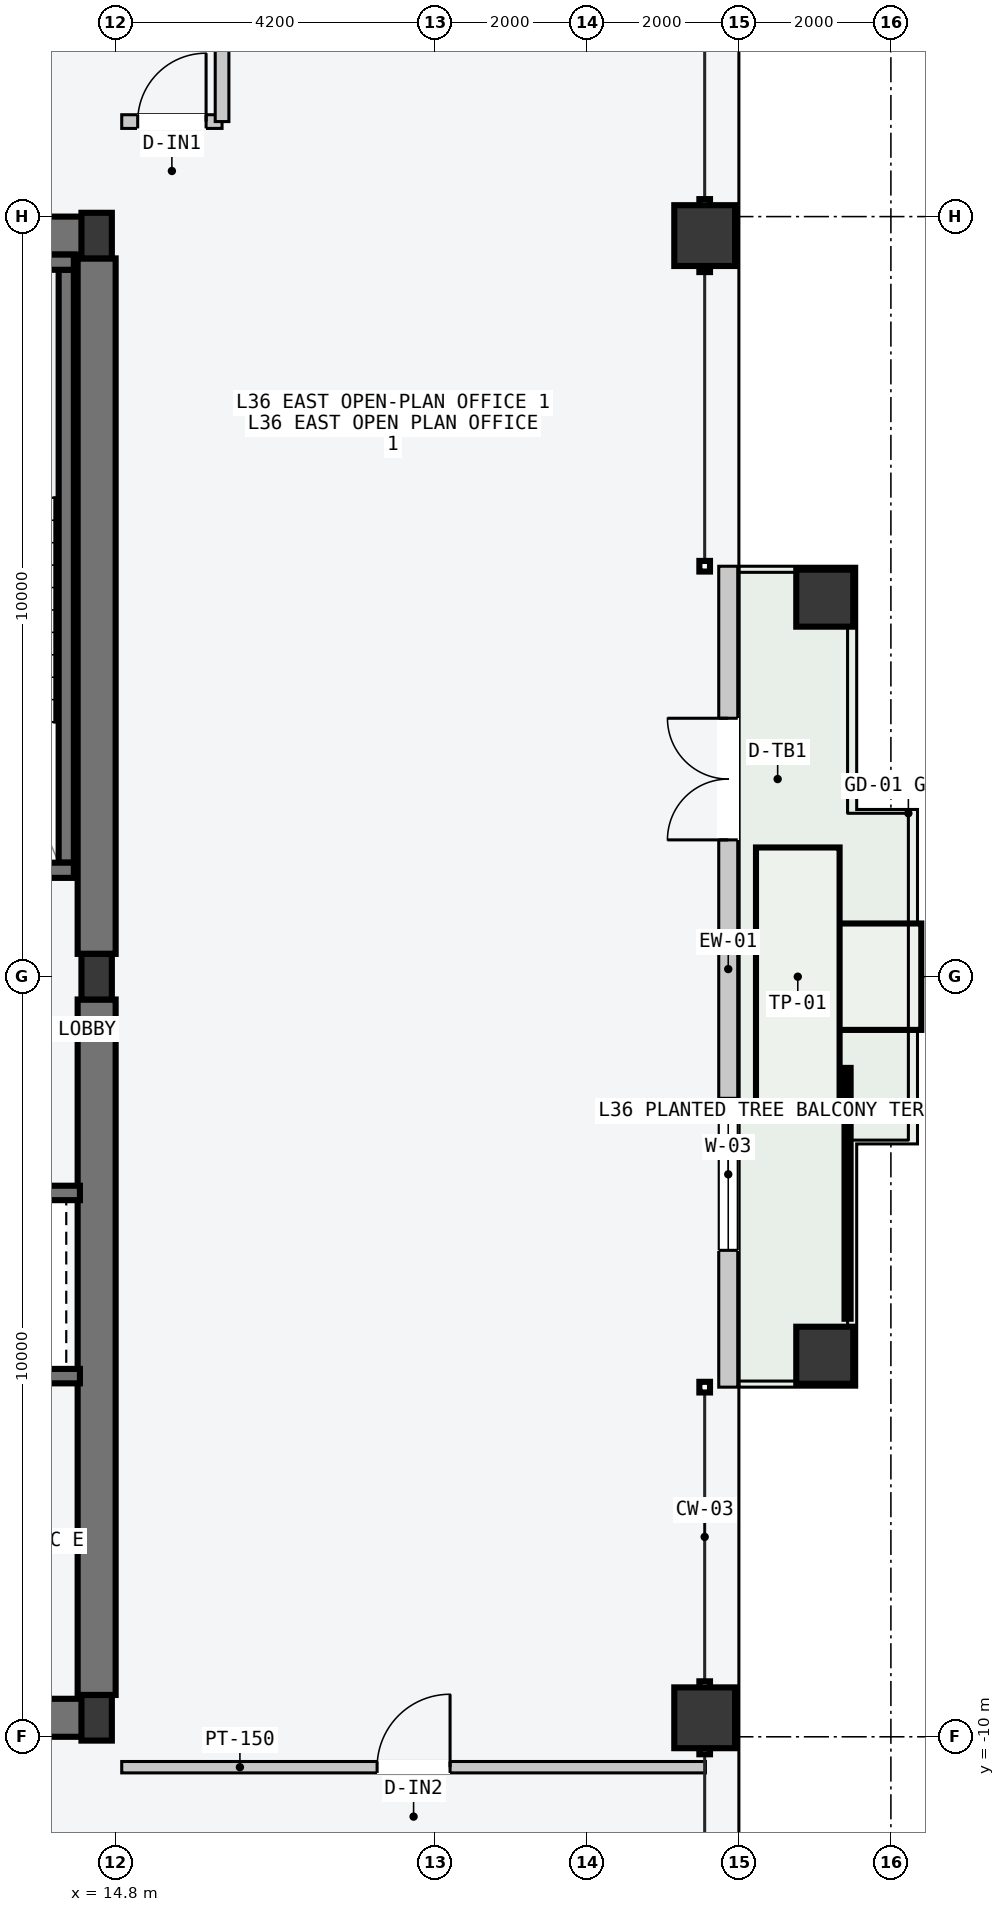
"""IFC4 building model, lengths in metres.
Left out: names, types, materials, properties, quantities, classifications, styles, units other than length and angle.
Written with IfcOpenShell. Run it as: python <this file> out.ifc"""

import sys

from ifc_helpers import new_model, si_unit, direction, frame, frame_2d, origin, origin_2d, place, context, subcontext, project, spatial, rectangle, hollow_rectangle, i_section, extrude, element, fill, save


model = new_model("IFC4")
c1 = context("Model", 3, precision=1e-05, world=origin(), true_north=direction((0.0, 1.0)))
c2 = subcontext(c1, "Body", "Model", "MODEL_VIEW")
j1 = project(units=[si_unit("LENGTHUNIT", "METRE"), si_unit("PLANEANGLEUNIT", "RADIAN")], contexts=[c1])
p1 = place(None, origin())
s1 = spatial("IfcSite", under=j1, at=p1, CompositionType="ELEMENT")
p2 = place(p1, origin())
s2 = spatial("IfcBuilding", under=s1, at=p2, CompositionType="ELEMENT")
p3 = place(p2, frame((0.0, 0.0, 138.6)))
s3 = spatial("IfcBuildingStorey", under=s2, at=p3, CompositionType="ELEMENT", Elevation=138.6)
for number, where, z_axis, x_axis in (
    (1, (8.07, -9.75, -0.2), (0.0, 0.0, 1.0), (1.0, 0.0, 0.0)),
    (2, (8.07, 9.75, -0.2), (0.0, 0.0, 1.0), (1.0, 0.0, 0.0)),
):
    element("IfcWall", number, at=place(p3, frame(where, z_axis=z_axis, x_axis=x_axis)), inside=s3, PredefinedType="SHEAR", context=c2, shape_type="SweptSolid", body=[
        extrude(rectangle(XDim=6.46, YDim=0.5, at=frame_2d((3.23, 0.0))), origin(), (0.0, 0.0, 1.0), 3.6),
    ])
for number, where, z_axis, x_axis in (
    (3, (14.55, -9.45, -0.2), (0.0, 0.0, 1.0), (0.0, 1.0, 0.0)),
    (4, (14.55, 0.3, -0.2), (0.0, 0.0, 1.0), (0.0, 1.0, 0.0)),
):
    element("IfcWall", number, at=place(p3, frame(where, z_axis=z_axis, x_axis=x_axis)), inside=s3, PredefinedType="SHEAR", context=c2, shape_type="SweptSolid", body=[
        extrude(rectangle(XDim=9.15, YDim=0.5, at=frame_2d((4.575, 0.0))), origin(), (0.0, 0.0, 1.0), 3.6),
    ])
p4 = place(p3, frame((14.15, 1.5, -0.2), z_axis=(0.0, 0.0, 1.0), x_axis=(0.0, 1.0, 0.0)))
e5 = element("IfcWall", 5, at=p4, inside=s3, PredefinedType="SOLIDWALL", context=c2, shape_type="SweptSolid", body=[
    extrude(rectangle(XDim=7.8, YDim=0.2, at=frame_2d((3.9, 0.0))), origin(), (0.0, 0.0, 1.0), 3.6),
])
p5 = place(p3, frame((10.15, 1.4, -0.2), z_axis=(0.0, 0.0, 1.0), x_axis=(1.0, 0.0, 0.0)))
e6 = element("IfcWall", 6, at=p5, inside=s3, PredefinedType="SOLIDWALL", context=c2, shape_type="SweptSolid", body=[
    extrude(rectangle(XDim=4.1, YDim=0.2, at=frame_2d((2.05, 0.0))), origin(), (0.0, 0.0, 1.0), 3.6),
])
p6 = place(p5, frame((1.5, 0.0, 0.2)))
e7 = element("IfcOpeningElement", 7, at=p6, cuts=e6, PredefinedType="OPENING", context=c2, shape_type="SweptSolid", body=[
    extrude(rectangle(XDim=1.12, YDim=2.18, at=frame_2d((0.56, 1.09))), frame((0.0, 0.11, 0.0), z_axis=(0.0, -1.0, 0.0), x_axis=(1.0, 0.0, 0.0)), (0.0, 0.0, 1.0), 0.22),
])
p7 = place(p3, frame((10.15, 9.4, -0.2), z_axis=(0.0, 0.0, 1.0), x_axis=(1.0, 0.0, 0.0)))
e8 = element("IfcWall", 8, at=p7, inside=s3, PredefinedType="SOLIDWALL", context=c2, shape_type="SweptSolid", body=[
    extrude(rectangle(XDim=4.1, YDim=0.2, at=frame_2d((2.05, 0.0))), origin(), (0.0, 0.0, 1.0), 3.6),
])
for number, where, z_axis, x_axis in (
    (9, (14.55, -9.75, 0.0), (0.0, 0.0, 1.0), (1.0, 0.0, 0.0)),
    (10, (14.55, 0.0, 0.0), (0.0, 0.0, 1.0), (1.0, 0.0, 0.0)),
    (11, (14.55, 9.75, 0.0), (0.0, 0.0, 1.0), (1.0, 0.0, 0.0)),
):
    element("IfcColumn", number, at=place(p3, frame(where, z_axis=z_axis, x_axis=x_axis)), inside=s3, PredefinedType="COLUMN", context=c2, shape_type="SweptSolid", body=[
        extrude(i_section(OverallWidth=0.4, OverallDepth=0.6, WebThickness=0.022, FlangeThickness=0.036, at=origin_2d()), origin(), (0.0, 0.0, 1.0), 3.6),
    ])
for number, where, z_axis, x_axis in (
    (12, (22.55, -9.75, 0.0), (0.0, 0.0, 1.0), (0.0, 1.0, 0.0)),
    (13, (22.55, 9.75, 0.0), (0.0, 0.0, 1.0), (0.0, 1.0, 0.0)),
):
    element("IfcColumn", number, at=place(p3, frame(where, z_axis=z_axis, x_axis=x_axis)), inside=s3, PredefinedType="COLUMN", context=c2, shape_type="SweptSolid", body=[
        extrude(hollow_rectangle(XDim=0.8, YDim=0.8, WallThickness=0.036, at=origin_2d()), origin(), (0.0, 0.0, 1.0), 3.6),
    ])
for number, where, z_axis, x_axis in (
    (14, (24.13, -4.98, 0.0), (0.0, 0.0, 1.0), (0.0, 1.0, 0.0)),
    (15, (24.13, 4.98, 0.0), (0.0, 0.0, 1.0), (0.0, 1.0, 0.0)),
):
    element("IfcColumn", number, at=place(p3, frame(where, z_axis=z_axis, x_axis=x_axis)), inside=s3, PredefinedType="COLUMN", context=c2, shape_type="SweptSolid", body=[
        extrude(hollow_rectangle(XDim=0.75, YDim=0.75, WallThickness=0.032, at=origin_2d()), origin(), (0.0, 0.0, 1.0), 3.6),
    ])
p8 = place(p3, frame((22.86, -5.4, 0.0), z_axis=(0.0, 0.0, 1.0), x_axis=(0.0, 1.0, 0.0)))
e16 = element("IfcWall", 16, at=p8, inside=s3, PredefinedType="STANDARD", context=c2, shape_type="SweptSolid", body=[
    extrude(rectangle(XDim=10.8, YDim=0.25, at=frame_2d((5.4, 0.0))), origin(), (0.0, 0.0, 1.0), 3.4),
])
p9 = place(p8, frame((7.2, 0.0, 0.0)))
e17 = element("IfcOpeningElement", 17, at=p9, cuts=e16, PredefinedType="OPENING", context=c2, shape_type="SweptSolid", body=[
    extrude(rectangle(XDim=1.6, YDim=2.2, at=frame_2d((0.8, 1.1))), frame((0.0, 0.135, 0.0), z_axis=(0.0, -1.0, 0.0), x_axis=(1.0, 0.0, 0.0)), (0.0, 0.0, 1.0), 0.27),
])
p10 = place(p8, frame((1.8, 0.0, 0.85)))
e18 = element("IfcOpeningElement", 18, at=p10, cuts=e16, PredefinedType="OPENING", context=c2, shape_type="SweptSolid", body=[
    extrude(rectangle(XDim=2.0, YDim=2.1, at=frame_2d((1.0, 1.05))), frame((0.0, 0.135, 0.0), z_axis=(0.0, -1.0, 0.0), x_axis=(1.0, 0.0, 0.0)), (0.0, 0.0, 1.0), 0.27),
])
p11 = place(p3, frame((11.65, -2.845, -0.2), z_axis=(0.0, 0.0, 1.0), x_axis=(1.0, 0.0, 0.0)))
e19 = element("IfcWall", 19, at=p11, inside=s3, PredefinedType="SOLIDWALL", context=c2, shape_type="SweptSolid", body=[
    extrude(rectangle(XDim=2.68, YDim=0.19, at=frame_2d((1.34, 0.0))), origin(), (0.0, 0.0, 1.0), 3.6),
])
p12 = place(p11, frame((0.65, 0.0, 0.2)))
e20 = element("IfcOpeningElement", 20, at=p12, cuts=e19, PredefinedType="OPENING", context=c2, shape_type="SweptSolid", body=[
    extrude(rectangle(XDim=1.2, YDim=2.2, at=frame_2d((0.6, 1.1))), frame((0.0, 0.105, 0.0), z_axis=(0.0, -1.0, 0.0), x_axis=(1.0, 0.0, 0.0)), (0.0, 0.0, 1.0), 0.21),
])
p13 = place(p3, frame((11.65, -5.255, -0.2), z_axis=(0.0, 0.0, 1.0), x_axis=(1.0, 0.0, 0.0)))
e21 = element("IfcWall", 21, at=p13, inside=s3, PredefinedType="SOLIDWALL", context=c2, shape_type="SweptSolid", body=[
    extrude(rectangle(XDim=2.68, YDim=0.19, at=frame_2d((1.34, 0.0))), origin(), (0.0, 0.0, 1.0), 3.6),
])
p14 = place(p3, frame((14.88, -10.4, 0.0), z_axis=(0.0, 0.0, 1.0), x_axis=(1.0, 0.0, 0.0)))
e22 = element("IfcWall", 22, at=p14, inside=s3, PredefinedType="PARTITIONING", context=c2, shape_type="SweptSolid", body=[
    extrude(rectangle(XDim=7.68, YDim=0.15, at=frame_2d((3.84, 0.0))), origin(), (0.0, 0.0, 1.0), 3.4),
])
p15 = place(p14, frame((3.36, 0.0, 0.0)))
e23 = element("IfcOpeningElement", 23, at=p15, cuts=e22, PredefinedType="OPENING", context=c2, shape_type="SweptSolid", body=[
    extrude(rectangle(XDim=0.96, YDim=2.18, at=frame_2d((0.48, 1.09))), frame((0.0, 0.085, 0.0), z_axis=(0.0, -1.0, 0.0), x_axis=(1.0, 0.0, 0.0)), (0.0, 0.0, 1.0), 0.17),
])
p16 = place(p3, frame((14.88, 11.25, 0.0), z_axis=(0.0, 0.0, 1.0), x_axis=(1.0, 0.0, 0.0)))
e24 = element("IfcWall", 24, at=p16, inside=s3, PredefinedType="PARTITIONING", context=c2, shape_type="SweptSolid", body=[
    extrude(rectangle(XDim=1.32, YDim=0.18, at=frame_2d((0.66, 0.0))), origin(), (0.0, 0.0, 1.0), 3.4),
])
p17 = place(p16, frame((0.21, 0.0, 0.0)))
e25 = element("IfcOpeningElement", 25, at=p17, cuts=e24, PredefinedType="OPENING", context=c2, shape_type="SweptSolid", body=[
    extrude(rectangle(XDim=0.9, YDim=2.15, at=frame_2d((0.45, 1.075))), frame((0.0, 0.1, 0.0), z_axis=(0.0, -1.0, 0.0), x_axis=(1.0, 0.0, 0.0)), (0.0, 0.0, 1.0), 0.2),
])
p18 = place(p3, frame((16.2, 11.25, 0.0), z_axis=(0.0, 0.0, 1.0), x_axis=(0.0, 1.0, 0.0)))
e26 = element("IfcWall", 26, at=p18, inside=s3, PredefinedType="PARTITIONING", context=c2, shape_type="SweptSolid", body=[
    extrude(rectangle(XDim=1.95, YDim=0.18, at=frame_2d((0.975, 0.0))), origin(), (0.0, 0.0, 1.0), 3.4),
])
p19 = place(p9, origin())
e27 = element("IfcDoor", 27, at=p19, inside=s3, OperationType="DOUBLE_DOOR_SINGLE_SWING", PredefinedType="DOOR", context=c2, shape_type="SweptSolid", body=[
    extrude(rectangle(XDim=1.6, YDim=2.2, at=frame_2d((0.8, 1.1))), frame((0.0, 0.025, 0.0), z_axis=(0.0, -1.0, 0.0), x_axis=(1.0, 0.0, 0.0)), (0.0, 0.0, 1.0), 0.05),
])
fill(e17, e27)
p20 = place(p10, origin())
e28 = element("IfcWindow", 28, at=p20, inside=s3, PartitioningType="SINGLE_PANEL", PredefinedType="WINDOW", context=c2, shape_type="SweptSolid", body=[
    extrude(rectangle(XDim=2.0, YDim=2.1, at=frame_2d((1.0, 1.05))), frame((0.0, 0.03, 0.0), z_axis=(0.0, -1.0, 0.0), x_axis=(1.0, 0.0, 0.0)), (0.0, 0.0, 1.0), 0.06),
])
fill(e18, e28)
p21 = place(p15, origin())
e29 = element("IfcDoor", 29, at=p21, inside=s3, OperationType="SINGLE_SWING_RIGHT", PredefinedType="DOOR", context=c2, shape_type="SweptSolid", body=[
    extrude(rectangle(XDim=0.96, YDim=2.18, at=frame_2d((0.48, 1.09))), frame((0.0, 0.025, 0.0), z_axis=(0.0, -1.0, 0.0), x_axis=(1.0, 0.0, 0.0)), (0.0, 0.0, 1.0), 0.05),
])
fill(e23, e29)
p22 = place(p17, origin())
e30 = element("IfcDoor", 30, at=p22, inside=s3, OperationType="SINGLE_SWING_RIGHT", PredefinedType="DOOR", context=c2, shape_type="SweptSolid", body=[
    extrude(rectangle(XDim=0.9, YDim=2.15, at=frame_2d((0.45, 1.075))), frame((0.0, 0.025, 0.0), z_axis=(0.0, -1.0, 0.0), x_axis=(1.0, 0.0, 0.0)), (0.0, 0.0, 1.0), 0.05),
])
fill(e25, e30)
save(model, sys.argv[1])
